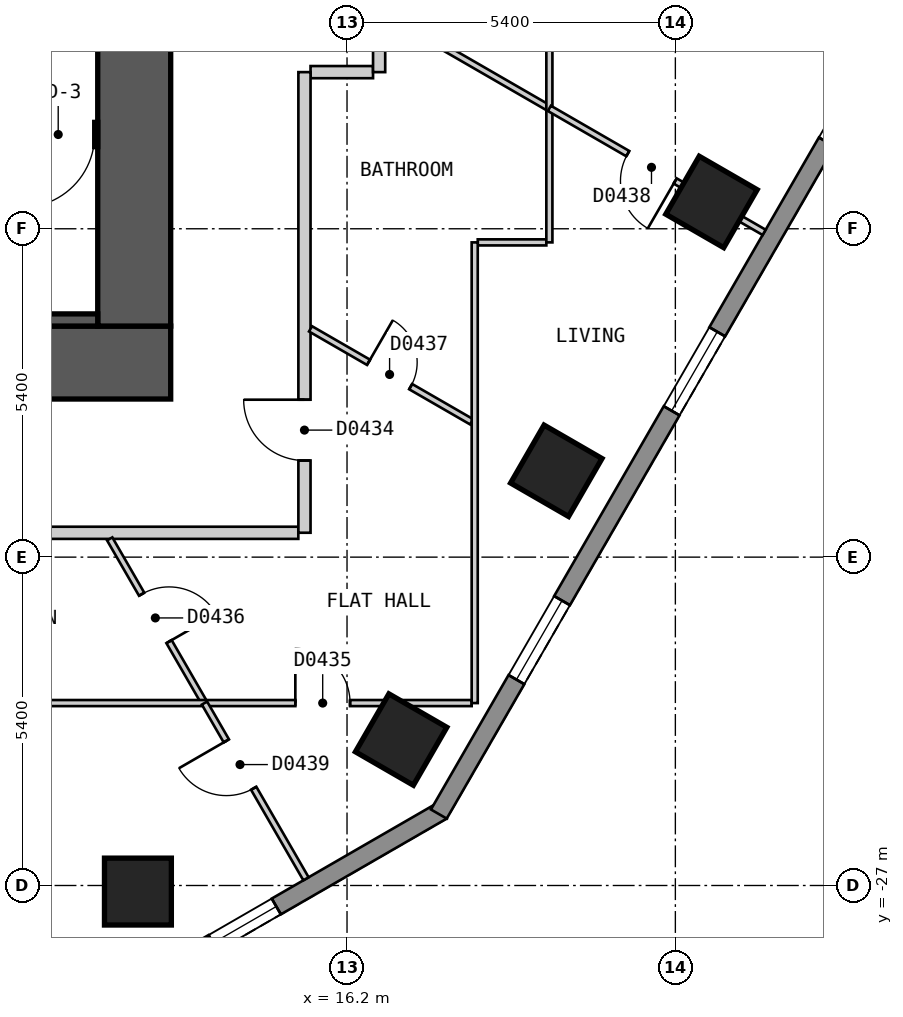
"""IFC4 building model, lengths in metres.
Left out: names, types, materials, properties, quantities, classifications, styles, units other than length and angle.
Written with IfcOpenShell. Run it as: python <this file> out.ifc"""

import sys

from ifc_helpers import new_model, si_unit, direction, frame, frame_2d, origin, origin_2d, place, context, subcontext, project, spatial, polyline, rectangle, outline, extrude, element, fill, save


model = new_model("IFC4")
c1 = context("Model", 3, precision=1e-05, world=origin(), true_north=direction((0.0, 1.0)))
c2 = subcontext(c1, "Body", "Model", "MODEL_VIEW")
j1 = project(units=[si_unit("LENGTHUNIT", "METRE"), si_unit("PLANEANGLEUNIT", "RADIAN")], contexts=[c1])
p1 = place(None, origin())
s1 = spatial("IfcSite", under=j1, at=p1, CompositionType="ELEMENT")
p2 = place(p1, origin())
s2 = spatial("IfcBuilding", under=s1, at=p2, CompositionType="ELEMENT")
p3 = place(p2, frame((0.0, 0.0, 32.4)))
s3 = spatial("IfcBuildingStorey", under=s2, at=p3, CompositionType="ELEMENT", Elevation=32.4)
for number, where, z_axis, x_axis in (
    (1, (12.761, -27.1, 0.0), (0.0, 0.0, 1.0), (1.0, 0.0, 0.0)),
    (2, (17.09, -24.6, 0.0), (0.0, 0.0, 1.0), (0.5, 0.866, 0.0)),
    (3, (19.642, -20.18, 0.0), (0.0, 0.0, 1.0), (0.5, 0.866, 0.0)),
    (4, (22.194, -15.759, 0.0), (0.0, 0.0, 1.0), (0.5, 0.866, 0.0)),
):
    element("IfcColumn", number, at=place(p3, frame(where, z_axis=z_axis, x_axis=x_axis)), inside=s3, PredefinedType="COLUMN", context=c2, shape_type="SweptSolid", body=[
        extrude(rectangle(XDim=1.1, YDim=1.1, at=origin_2d()), origin(), (0.0, 0.0, 1.0), 3.0),
    ])
p4 = place(p3, frame((-13.3, -18.4, 0.0), z_axis=(0.0, 0.0, 1.0), x_axis=(1.0, 0.0, 0.0)))
e5 = element("IfcWall", 5, at=p4, inside=s3, PredefinedType="SHEAR", context=c2, shape_type="SweptSolid", body=[
    extrude(rectangle(XDim=26.6, YDim=1.2, at=frame_2d((13.3, 0.0))), origin(), (0.0, 0.0, 1.0), 2.7),
])
p5 = place(p3, frame((12.7, -17.8, 0.0), z_axis=(0.0, 0.0, 1.0), x_axis=(0.0, 1.0, 0.0)))
e6 = element("IfcWall", 6, at=p5, inside=s3, PredefinedType="SHEAR", context=c2, shape_type="SweptSolid", body=[
    extrude(rectangle(XDim=11.6, YDim=1.2, at=frame_2d((5.8, 0.0))), origin(), (0.0, 0.0, 1.0), 2.7),
])
p6 = place(p3, frame((-12.1, -14.65, 0.0), z_axis=(0.0, 0.0, 1.0), x_axis=(1.0, 0.0, 0.0)))
e7 = element("IfcWall", 7, at=p6, inside=s3, PredefinedType="SHEAR", context=c2, shape_type="SweptSolid", body=[
    extrude(rectangle(XDim=24.2, YDim=0.4, at=frame_2d((12.1, 0.0))), origin(), (0.0, 0.0, 1.0), 2.7),
])
p7 = place(p6, frame((1.3, 0.0, 0.0), z_axis=(0.0, 0.0, 1.0), x_axis=(-1.0, 0.0, 0.0)))
e8 = element("IfcOpeningElement", 8, at=p7, cuts=e7, PredefinedType="OPENING", context=c2, shape_type="SweptSolid", body=[
    extrude(rectangle(XDim=1.2, YDim=2.1, at=frame_2d((0.6, 1.05))), frame((0.0, 0.21, 0.0), z_axis=(0.0, -1.0, 0.0), x_axis=(1.0, 0.0, 0.0)), (0.0, 0.0, 1.0), 0.42),
])
p8 = place(p6, frame((24.15, 0.0, 0.0), z_axis=(0.0, 0.0, 1.0), x_axis=(-1.0, 0.0, 0.0)))
e9 = element("IfcOpeningElement", 9, at=p8, cuts=e7, PredefinedType="OPENING", context=c2, shape_type="SweptSolid", body=[
    extrude(rectangle(XDim=1.2, YDim=2.1, at=frame_2d((0.6, 1.05))), frame((0.0, 0.21, 0.0), z_axis=(0.0, -1.0, 0.0), x_axis=(1.0, 0.0, 0.0)), (0.0, 0.0, 1.0), 0.42),
])
p9 = place(p6, frame((16.6, 0.0, 0.0), z_axis=(0.0, 0.0, 1.0), x_axis=(-1.0, 0.0, 0.0)))
e10 = element("IfcOpeningElement", 10, at=p9, cuts=e7, PredefinedType="OPENING", context=c2, shape_type="SweptSolid", body=[
    extrude(rectangle(XDim=1.0, YDim=2.1, at=frame_2d((0.5, 1.05))), frame((0.0, 0.21, 0.0), z_axis=(0.0, -1.0, 0.0), x_axis=(1.0, 0.0, 0.0)), (0.0, 0.0, 1.0), 0.42),
])
p10 = place(p6, frame((18.35, 0.0, 0.0), z_axis=(0.0, 0.0, 1.0), x_axis=(-1.0, 0.0, 0.0)))
e11 = element("IfcOpeningElement", 11, at=p10, cuts=e7, PredefinedType="OPENING", context=c2, shape_type="SweptSolid", body=[
    extrude(rectangle(XDim=0.9, YDim=2.1, at=frame_2d((0.45, 1.05))), frame((0.0, 0.21, 0.0), z_axis=(0.0, -1.0, 0.0), x_axis=(1.0, 0.0, 0.0)), (0.0, 0.0, 1.0), 0.42),
])
p11 = place(p3, frame((13.435, -28.27, 0.0), z_axis=(0.0, 0.0, 1.0), x_axis=(0.866010750942, 0.50002537861, 0.0)))
e12 = element("IfcWall", 12, at=p11, inside=s3, PredefinedType="SOLIDWALL", context=c2, shape_type="SweptSolid", body=[
    extrude(outline(polyline([(0.0, -0.15), (5.0, -0.15), (4.919, 0.15), (0.08, 0.15), (0.0, -0.15)])), origin(), (0.0, 0.0, 1.0), 2.7),
])
p12 = place(p11, frame((0.65, 0.0, 0.15)))
e13 = element("IfcOpeningElement", 13, at=p12, cuts=e12, PredefinedType="OPENING", context=c2, shape_type="SweptSolid", body=[
    extrude(rectangle(XDim=1.2, YDim=2.1, at=frame_2d((0.6, 1.05))), frame((0.0, 0.16, 0.0), z_axis=(0.0, -1.0, 0.0), x_axis=(1.0, 0.0, 0.0)), (0.0, 0.0, 1.0), 0.32),
])
p13 = place(p3, frame((17.71, -25.825, 0.0), z_axis=(0.0, 0.0, 1.0), x_axis=(0.500001938803, 0.866024284413, 0.0)))
e14 = element("IfcWall", 14, at=p13, inside=s3, PredefinedType="SOLIDWALL", context=c2, shape_type="SweptSolid", body=[
    extrude(outline(polyline([(0.0, -0.15), (27.02, -0.15), (26.94, 0.15), (0.08, 0.15), (0.0, -0.15)])), origin(), (0.0, 0.0, 1.0), 2.7),
])
p14 = place(p13, frame((2.553, 0.0, 0.15)))
e15 = element("IfcOpeningElement", 15, at=p14, cuts=e14, PredefinedType="OPENING", context=c2, shape_type="SweptSolid", body=[
    extrude(rectangle(XDim=1.5, YDim=2.1, at=frame_2d((0.75, 1.05))), frame((0.0, 0.16, 0.0), z_axis=(0.0, -1.0, 0.0), x_axis=(1.0, 0.0, 0.0)), (0.0, 0.0, 1.0), 0.32),
])
p15 = place(p13, frame((7.658, 0.0, 0.15)))
e16 = element("IfcOpeningElement", 16, at=p15, cuts=e14, PredefinedType="OPENING", context=c2, shape_type="SweptSolid", body=[
    extrude(rectangle(XDim=1.5, YDim=2.1, at=frame_2d((0.75, 1.05))), frame((0.0, 0.16, 0.0), z_axis=(0.0, -1.0, 0.0), x_axis=(1.0, 0.0, 0.0)), (0.0, 0.0, 1.0), 0.32),
])
p16 = place(p13, frame((12.761, 0.0, 0.15)))
e17 = element("IfcOpeningElement", 17, at=p16, cuts=e14, PredefinedType="OPENING", context=c2, shape_type="SweptSolid", body=[
    extrude(rectangle(XDim=1.5, YDim=2.1, at=frame_2d((0.75, 1.05))), frame((0.0, 0.16, 0.0), z_axis=(0.0, -1.0, 0.0), x_axis=(1.0, 0.0, 0.0)), (0.0, 0.0, 1.0), 0.32),
])
p17 = place(p13, frame((17.865, 0.0, 0.15)))
e18 = element("IfcOpeningElement", 18, at=p17, cuts=e14, PredefinedType="OPENING", context=c2, shape_type="SweptSolid", body=[
    extrude(rectangle(XDim=1.5, YDim=2.1, at=frame_2d((0.75, 1.05))), frame((0.0, 0.16, 0.0), z_axis=(0.0, -1.0, 0.0), x_axis=(1.0, 0.0, 0.0)), (0.0, 0.0, 1.0), 0.32),
])
p18 = place(p13, frame((22.969, 0.0, 0.15)))
e19 = element("IfcOpeningElement", 19, at=p18, cuts=e14, PredefinedType="OPENING", context=c2, shape_type="SweptSolid", body=[
    extrude(rectangle(XDim=1.5, YDim=2.1, at=frame_2d((0.75, 1.05))), frame((0.0, 0.16, 0.0), z_axis=(0.0, -1.0, 0.0), x_axis=(1.0, 0.0, 0.0)), (0.0, 0.0, 1.0), 0.32),
])
p19 = place(p3, frame((15.6, -13.624, 0.0), z_axis=(0.0, 0.0, 1.0), x_axis=(1.0, 0.0, 0.0)))
e20 = element("IfcWall", 20, at=p19, inside=s3, PredefinedType="PARTITIONING", context=c2, shape_type="SweptSolid", body=[
    extrude(rectangle(XDim=1.028, YDim=0.2, at=frame_2d((0.514, 0.0))), origin(), (0.0, 0.0, 1.0), 2.7),
])
p20 = place(p3, frame((-15.499, -21.2, 0.0), z_axis=(0.0, 0.0, 1.0), x_axis=(1.0, 0.0, 0.0)))
e21 = element("IfcWall", 21, at=p20, inside=s3, PredefinedType="PARTITIONING", context=c2, shape_type="SweptSolid", body=[
    extrude(rectangle(XDim=30.898, YDim=0.2, at=frame_2d((15.449, 0.0))), origin(), (0.0, 0.0, 1.0), 2.7),
])
p21 = place(p20, frame((15.0, 0.0, 0.0)))
e22 = element("IfcOpeningElement", 22, at=p21, cuts=e21, PredefinedType="OPENING", context=c2, shape_type="SweptSolid", body=[
    extrude(rectangle(XDim=1.0, YDim=2.1, at=frame_2d((0.5, 1.05))), frame((0.0, 0.11, 0.0), z_axis=(0.0, -1.0, 0.0), x_axis=(1.0, 0.0, 0.0)), (0.0, 0.0, 1.0), 0.22),
])
p22 = place(p20, frame((20.104, 0.0, 0.0)))
e23 = element("IfcOpeningElement", 23, at=p22, cuts=e21, PredefinedType="OPENING", context=c2, shape_type="SweptSolid", body=[
    extrude(rectangle(XDim=1.0, YDim=2.1, at=frame_2d((0.5, 1.05))), frame((0.0, 0.11, 0.0), z_axis=(0.0, -1.0, 0.0), x_axis=(1.0, 0.0, 0.0)), (0.0, 0.0, 1.0), 0.22),
])
p23 = place(p3, frame((15.5, -21.199, 0.0), z_axis=(0.0, 0.0, 1.0), x_axis=(0.0, 1.0, 0.0)))
e24 = element("IfcWall", 24, at=p23, inside=s3, PredefinedType="PARTITIONING", context=c2, shape_type="SweptSolid", body=[
    extrude(rectangle(XDim=7.575, YDim=0.2, at=frame_2d((3.788, 0.0))), origin(), (0.0, 0.0, 1.0), 2.7),
])
p24 = place(p23, frame((1.188, 0.0, 0.0)))
e25 = element("IfcOpeningElement", 25, at=p24, cuts=e24, PredefinedType="OPENING", context=c2, shape_type="SweptSolid", body=[
    extrude(rectangle(XDim=1.0, YDim=2.1, at=frame_2d((0.5, 1.05))), frame((0.0, 0.11, 0.0), z_axis=(0.0, -1.0, 0.0), x_axis=(1.0, 0.0, 0.0)), (0.0, 0.0, 1.0), 0.22),
])
p25 = place(p3, frame((16.728, -13.624, 0.0), z_axis=(0.0, 0.0, 1.0), x_axis=(0.0, 1.0, 0.0)))
e26 = element("IfcWall", 26, at=p25, inside=s3, PredefinedType="PARTITIONING", context=c2, shape_type="SweptSolid", body=[
    extrude(rectangle(XDim=4.83, YDim=0.2, at=frame_2d((2.415, 0.0))), origin(), (0.0, 0.0, 1.0), 2.7),
])
p26 = place(p3, frame((12.297, -21.3, 0.0), z_axis=(0.0, 0.0, 1.0), x_axis=(0.500004896655, -0.866022576681, 0.0)))
e27 = element("IfcWall", 27, at=p26, inside=s3, PredefinedType="PARTITIONING", context=c2, shape_type="SweptSolid", body=[
    extrude(rectangle(XDim=3.118, YDim=0.1, at=frame_2d((1.559, 0.0))), origin(), (0.0, 0.0, 1.0), 2.7),
])
p27 = place(p26, frame((1.051, 0.0, 0.0)))
e28 = element("IfcOpeningElement", 28, at=p27, cuts=e27, PredefinedType="OPENING", context=c2, shape_type="SweptSolid", body=[
    extrude(rectangle(XDim=0.9, YDim=2.1, at=frame_2d((0.45, 1.05))), frame((0.0, 0.06, 0.0), z_axis=(0.0, -1.0, 0.0), x_axis=(1.0, 0.0, 0.0)), (0.0, 0.0, 1.0), 0.12),
])
p28 = place(p3, frame((15.6, -17.846, 0.0), z_axis=(0.0, 0.0, 1.0), x_axis=(0.866148385016, -0.499786929736, 0.0)))
e29 = element("IfcWall", 29, at=p28, inside=s3, PredefinedType="PARTITIONING", context=c2, shape_type="SweptSolid", body=[
    extrude(rectangle(XDim=3.059, YDim=0.1, at=frame_2d((1.53, 0.0))), origin(), (0.0, 0.0, 1.0), 2.7),
])
p29 = place(p28, frame((1.101, 0.0, 0.0)))
e30 = element("IfcOpeningElement", 30, at=p29, cuts=e29, PredefinedType="OPENING", context=c2, shape_type="SweptSolid", body=[
    extrude(rectangle(XDim=0.8, YDim=2.1, at=frame_2d((0.4, 1.05))), frame((0.0, 0.06, 0.0), z_axis=(0.0, -1.0, 0.0), x_axis=(1.0, 0.0, 0.0)), (0.0, 0.0, 1.0), 0.12),
])
p30 = place(p3, frame((16.828, -12.661, 0.0), z_axis=(0.0, 0.0, 1.0), x_axis=(0.866008246423, -0.500029716244, 0.0)))
e31 = element("IfcWall", 31, at=p30, inside=s3, PredefinedType="PARTITIONING", context=c2, shape_type="SweptSolid", body=[
    extrude(rectangle(XDim=3.118, YDim=0.1, at=frame_2d((1.559, 0.0))), origin(), (0.0, 0.0, 1.0), 2.7),
])
p31 = place(p3, frame((18.35, -16.424, 0.0), z_axis=(0.0, 0.0, 1.0), x_axis=(1.0, 0.0, 0.0)))
e32 = element("IfcWall", 32, at=p31, inside=s3, PredefinedType="PARTITIONING", context=c2, shape_type="SweptSolid", body=[
    extrude(rectangle(XDim=1.128, YDim=0.1, at=frame_2d((0.564, 0.0))), origin(), (0.0, 0.0, 1.0), 2.7),
])
p32 = place(p3, frame((7.757, -24.0, 0.0), z_axis=(0.0, 0.0, 1.0), x_axis=(1.0, 0.0, 0.0)))
e33 = element("IfcWall", 33, at=p32, inside=s3, PredefinedType="PARTITIONING", context=c2, shape_type="SweptSolid", body=[
    extrude(rectangle(XDim=10.493, YDim=0.1, at=frame_2d((5.247, 0.0))), origin(), (0.0, 0.0, 1.0), 2.7),
])
p33 = place(p32, frame((7.593, 0.0, 0.0)))
e34 = element("IfcOpeningElement", 34, at=p33, cuts=e33, PredefinedType="OPENING", context=c2, shape_type="SweptSolid", body=[
    extrude(rectangle(XDim=0.9, YDim=2.1, at=frame_2d((0.45, 1.05))), frame((0.0, 0.06, 0.0), z_axis=(0.0, -1.0, 0.0), x_axis=(1.0, 0.0, 0.0)), (0.0, 0.0, 1.0), 0.12),
])
p34 = place(p3, frame((18.3, -24.0, 0.0), z_axis=(0.0, 0.0, 1.0), x_axis=(0.0, 1.0, 0.0)))
e35 = element("IfcWall", 35, at=p34, inside=s3, PredefinedType="PARTITIONING", context=c2, shape_type="SweptSolid", body=[
    extrude(rectangle(XDim=7.576, YDim=0.1, at=frame_2d((3.788, 0.0))), origin(), (0.0, 0.0, 1.0), 2.7),
])
p35 = place(p3, frame((19.528, -16.424, 0.0), z_axis=(0.0, 0.0, 1.0), x_axis=(0.0, 1.0, 0.0)))
e36 = element("IfcWall", 36, at=p35, inside=s3, PredefinedType="PARTITIONING", context=c2, shape_type="SweptSolid", body=[
    extrude(rectangle(XDim=7.982, YDim=0.1, at=frame_2d((3.991, 0.0))), origin(), (0.0, 0.0, 1.0), 2.7),
])
p36 = place(p35, frame((4.75, 0.0, 0.0)))
e37 = element("IfcOpeningElement", 37, at=p36, cuts=e36, PredefinedType="OPENING", context=c2, shape_type="SweptSolid", body=[
    extrude(rectangle(XDim=0.8, YDim=2.1, at=frame_2d((0.4, 1.05))), frame((0.0, 0.06, 0.0), z_axis=(0.0, -1.0, 0.0), x_axis=(1.0, 0.0, 0.0)), (0.0, 0.0, 1.0), 0.12),
])
p37 = place(p3, frame((13.856, -24.0, 0.0), z_axis=(0.0, 0.0, 1.0), x_axis=(0.50010451262, -0.865965054986, 0.0)))
e38 = element("IfcWall", 38, at=p37, inside=s3, PredefinedType="PARTITIONING", context=c2, shape_type="SweptSolid", body=[
    extrude(rectangle(XDim=3.337, YDim=0.1, at=frame_2d((1.668, 0.0))), origin(), (0.0, 0.0, 1.0), 2.7),
])
p38 = place(p37, frame((0.718, 0.0, 0.0)))
e39 = element("IfcOpeningElement", 39, at=p38, cuts=e38, PredefinedType="OPENING", context=c2, shape_type="SweptSolid", body=[
    extrude(rectangle(XDim=0.9, YDim=2.1, at=frame_2d((0.45, 1.05))), frame((0.0, 0.06, 0.0), z_axis=(0.0, -1.0, 0.0), x_axis=(1.0, 0.0, 0.0)), (0.0, 0.0, 1.0), 0.12),
])
p39 = place(p3, frame((19.528, -14.22, 0.0), z_axis=(0.0, 0.0, 1.0), x_axis=(0.866039047082, -0.499976368371, 0.0)))
e40 = element("IfcWall", 40, at=p39, inside=s3, PredefinedType="PARTITIONING", context=c2, shape_type="SweptSolid", body=[
    extrude(rectangle(XDim=4.078, YDim=0.1, at=frame_2d((2.039, 0.0))), origin(), (0.0, 0.0, 1.0), 2.7),
])
p40 = place(p39, frame((1.489, 0.0, 0.0)))
e41 = element("IfcOpeningElement", 41, at=p40, cuts=e40, PredefinedType="OPENING", context=c2, shape_type="SweptSolid", body=[
    extrude(rectangle(XDim=0.9, YDim=2.1, at=frame_2d((0.45, 1.05))), frame((0.0, 0.06, 0.0), z_axis=(0.0, -1.0, 0.0), x_axis=(1.0, 0.0, 0.0)), (0.0, 0.0, 1.0), 0.12),
])
p41 = place(p3, frame((6.7, -17.7, 0.0), z_axis=(0.0, 0.0, 1.0), x_axis=(1.0, 0.0, 0.0)))
e42 = element("IfcWall", 42, at=p41, inside=s3, PredefinedType="SOLIDWALL", context=c2, shape_type="SweptSolid", body=[
    extrude(rectangle(XDim=5.4, YDim=0.2, at=frame_2d((2.7, 0.0))), origin(), (0.0, 0.0, 1.0), 2.7),
])
p42 = place(p12, origin())
e43 = element("IfcWindow", 43, at=p42, inside=s3, PartitioningType="SINGLE_PANEL", PredefinedType="WINDOW", context=c2, shape_type="SweptSolid", body=[
    extrude(rectangle(XDim=1.2, YDim=2.1, at=frame_2d((0.6, 1.05))), frame((0.0, 0.03, 0.0), z_axis=(0.0, -1.0, 0.0), x_axis=(1.0, 0.0, 0.0)), (0.0, 0.0, 1.0), 0.06),
])
fill(e13, e43)
p43 = place(p14, origin())
e44 = element("IfcWindow", 44, at=p43, inside=s3, PartitioningType="SINGLE_PANEL", PredefinedType="WINDOW", context=c2, shape_type="SweptSolid", body=[
    extrude(rectangle(XDim=1.5, YDim=2.1, at=frame_2d((0.75, 1.05))), frame((0.0, 0.03, 0.0), z_axis=(0.0, -1.0, 0.0), x_axis=(1.0, 0.0, 0.0)), (0.0, 0.0, 1.0), 0.06),
])
fill(e15, e44)
p44 = place(p15, origin())
e45 = element("IfcWindow", 45, at=p44, inside=s3, PartitioningType="SINGLE_PANEL", PredefinedType="WINDOW", context=c2, shape_type="SweptSolid", body=[
    extrude(rectangle(XDim=1.5, YDim=2.1, at=frame_2d((0.75, 1.05))), frame((0.0, 0.03, 0.0), z_axis=(0.0, -1.0, 0.0), x_axis=(1.0, 0.0, 0.0)), (0.0, 0.0, 1.0), 0.06),
])
fill(e16, e45)
p45 = place(p24, origin())
e46 = element("IfcDoor", 46, at=p45, inside=s3, OperationType="SINGLE_SWING_RIGHT", PredefinedType="DOOR", context=c2, shape_type="SweptSolid", body=[
    extrude(rectangle(XDim=1.0, YDim=2.1, at=frame_2d((0.5, 1.05))), frame((0.0, 0.025, 0.0), z_axis=(0.0, -1.0, 0.0), x_axis=(1.0, 0.0, 0.0)), (0.0, 0.0, 1.0), 0.05),
])
fill(e25, e46)
p46 = place(p33, origin())
e47 = element("IfcDoor", 47, at=p46, inside=s3, OperationType="SINGLE_SWING_LEFT", PredefinedType="DOOR", context=c2, shape_type="SweptSolid", body=[
    extrude(rectangle(XDim=0.9, YDim=2.1, at=frame_2d((0.45, 1.05))), frame((0.0, 0.025, 0.0), z_axis=(0.0, -1.0, 0.0), x_axis=(1.0, 0.0, 0.0)), (0.0, 0.0, 1.0), 0.05),
])
fill(e34, e47)
p47 = place(p27, origin())
e48 = element("IfcDoor", 48, at=p47, inside=s3, OperationType="SINGLE_SWING_RIGHT", PredefinedType="DOOR", context=c2, shape_type="SweptSolid", body=[
    extrude(rectangle(XDim=0.9, YDim=2.1, at=frame_2d((0.45, 1.05))), frame((0.0, 0.025, 0.0), z_axis=(0.0, -1.0, 0.0), x_axis=(1.0, 0.0, 0.0)), (0.0, 0.0, 1.0), 0.05),
])
fill(e28, e48)
p48 = place(p29, origin())
e49 = element("IfcDoor", 49, at=p48, inside=s3, OperationType="SINGLE_SWING_LEFT", PredefinedType="DOOR", context=c2, shape_type="SweptSolid", body=[
    extrude(rectangle(XDim=0.8, YDim=2.1, at=frame_2d((0.4, 1.05))), frame((0.0, 0.025, 0.0), z_axis=(0.0, -1.0, 0.0), x_axis=(1.0, 0.0, 0.0)), (0.0, 0.0, 1.0), 0.05),
])
fill(e30, e49)
p49 = place(p40, origin())
e50 = element("IfcDoor", 50, at=p49, inside=s3, OperationType="SINGLE_SWING_RIGHT", PredefinedType="DOOR", context=c2, shape_type="SweptSolid", body=[
    extrude(rectangle(XDim=0.9, YDim=2.1, at=frame_2d((0.45, 1.05))), frame((0.0, 0.025, 0.0), z_axis=(0.0, -1.0, 0.0), x_axis=(1.0, 0.0, 0.0)), (0.0, 0.0, 1.0), 0.05),
])
fill(e41, e50)
p50 = place(p38, origin())
e51 = element("IfcDoor", 51, at=p50, inside=s3, OperationType="SINGLE_SWING_LEFT", PredefinedType="DOOR", context=c2, shape_type="SweptSolid", body=[
    extrude(rectangle(XDim=0.9, YDim=2.1, at=frame_2d((0.45, 1.05))), frame((0.0, 0.025, 0.0), z_axis=(0.0, -1.0, 0.0), x_axis=(1.0, 0.0, 0.0)), (0.0, 0.0, 1.0), 0.05),
])
fill(e39, e51)
p51 = place(p8, origin())
e52 = element("IfcDoor", 52, at=p51, inside=s3, OperationType="SINGLE_SWING_RIGHT", PredefinedType="DOOR", context=c2, shape_type="SweptSolid", body=[
    extrude(rectangle(XDim=1.2, YDim=2.1, at=frame_2d((0.6, 1.05))), frame((0.0, 0.025, 0.0), z_axis=(0.0, -1.0, 0.0), x_axis=(1.0, 0.0, 0.0)), (0.0, 0.0, 1.0), 0.05),
])
fill(e9, e52)
save(model, sys.argv[1])
